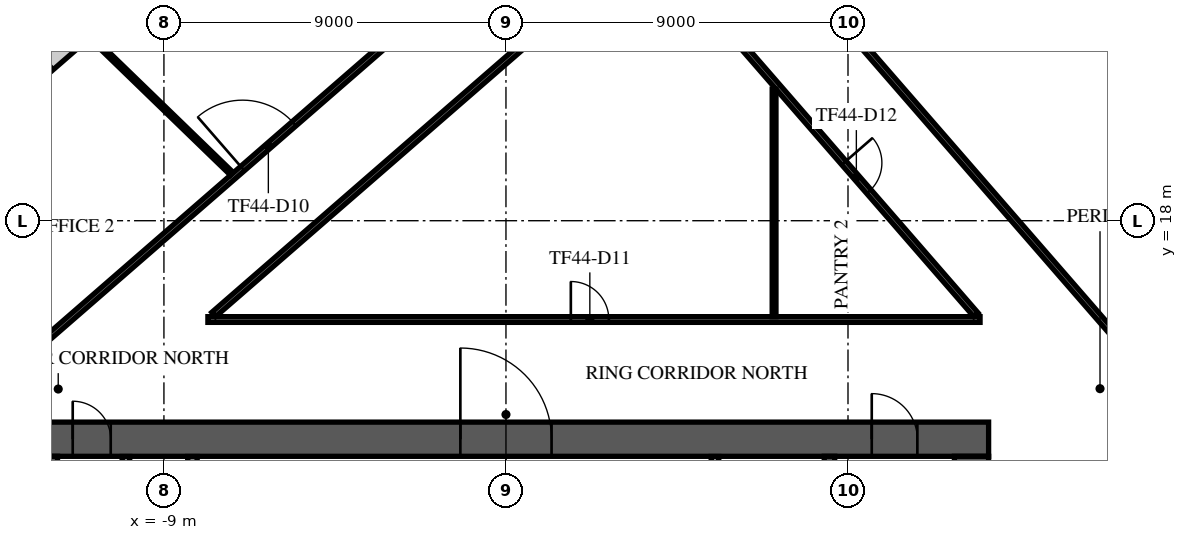
"""IFC4 building model, lengths in metres.
Left out: names, types, materials, properties, quantities, classifications, styles, units other than length and angle.
Written with IfcOpenShell. Run it as: python <this file> out.ifc"""

import sys

from ifc_helpers import new_model, si_unit, direction, frame, frame_2d, origin, place, context, subcontext, project, spatial, rectangle, extrude, element, fill, save


model = new_model("IFC4")
c1 = context("Model", 3, precision=1e-05, world=origin(), true_north=direction((0.0, 1.0)))
c2 = subcontext(c1, "Body", "Model", "MODEL_VIEW")
j1 = project(units=[si_unit("LENGTHUNIT", "METRE"), si_unit("PLANEANGLEUNIT", "RADIAN")], contexts=[c1])
p1 = place(None, origin())
s1 = spatial("IfcSite", under=j1, at=p1, CompositionType="ELEMENT")
p2 = place(p1, origin())
s2 = spatial("IfcBuilding", under=s1, at=p2, CompositionType="ELEMENT")
p3 = place(p2, frame((0.0, 0.0, 189.3)))
s3 = spatial("IfcBuildingStorey", under=s2, at=p3, CompositionType="ELEMENT", Elevation=189.3)
p4 = place(p3, frame((-12.7, 12.25, 0.0), z_axis=(0.0, 0.0, 1.0), x_axis=(1.0, 0.0, 0.0)))
e1 = element("IfcWall", 1, at=p4, inside=s3, PredefinedType="SHEAR", context=c2, shape_type="SweptSolid", body=[
    extrude(rectangle(XDim=25.4, YDim=0.9, at=frame_2d((12.7, 0.0))), origin(), (0.0, 0.0, 1.0), 3.62),
])
p5 = place(p4, frame((11.5, 0.0, 0.0)))
e2 = element("IfcOpeningElement", 2, at=p5, cuts=e1, PredefinedType="OPENING", context=c2, shape_type="SweptSolid", body=[
    extrude(rectangle(XDim=2.4, YDim=2.4, at=frame_2d((1.2, 1.2))), frame((0.0, 0.46, 0.0), z_axis=(0.0, -1.0, 0.0), x_axis=(1.0, 0.0, 0.0)), (0.0, 0.0, 1.0), 0.92),
])
p6 = place(p4, frame((22.325, 0.0, 0.0)))
e3 = element("IfcOpeningElement", 3, at=p6, cuts=e1, PredefinedType="OPENING", context=c2, shape_type="SweptSolid", body=[
    extrude(rectangle(XDim=1.2, YDim=2.1, at=frame_2d((0.6, 1.05))), frame((0.0, 0.46, 0.0), z_axis=(0.0, -1.0, 0.0), x_axis=(1.0, 0.0, 0.0)), (0.0, 0.0, 1.0), 0.92),
])
p7 = place(p4, frame((1.3, 0.0, 0.0)))
e4 = element("IfcOpeningElement", 4, at=p7, cuts=e1, PredefinedType="OPENING", context=c2, shape_type="SweptSolid", body=[
    extrude(rectangle(XDim=1.0, YDim=2.1, at=frame_2d((0.5, 1.05))), frame((0.0, 0.46, 0.0), z_axis=(0.0, -1.0, 0.0), x_axis=(1.0, 0.0, 0.0)), (0.0, 0.0, 1.0), 0.92),
])
p8 = place(p3, frame((12.25, -11.8, 0.0), z_axis=(0.0, 0.0, 1.0), x_axis=(0.0, 1.0, 0.0)))
e5 = element("IfcWall", 5, at=p8, inside=s3, PredefinedType="SHEAR", context=c2, shape_type="SweptSolid", body=[
    extrude(rectangle(XDim=23.6, YDim=0.9, at=frame_2d((11.8, 0.0))), origin(), (0.0, 0.0, 1.0), 3.62),
])
p9 = place(p8, frame((10.6, 0.0, 0.0)))
e6 = element("IfcOpeningElement", 6, at=p9, cuts=e5, PredefinedType="OPENING", context=c2, shape_type="SweptSolid", body=[
    extrude(rectangle(XDim=2.4, YDim=2.4, at=frame_2d((1.2, 1.2))), frame((0.0, 0.46, 0.0), z_axis=(0.0, -1.0, 0.0), x_axis=(1.0, 0.0, 0.0)), (0.0, 0.0, 1.0), 0.92),
])
p10 = place(p3, frame((-12.25, -11.8, 0.0), z_axis=(0.0, 0.0, 1.0), x_axis=(0.0, 1.0, 0.0)))
e7 = element("IfcWall", 7, at=p10, inside=s3, PredefinedType="SHEAR", context=c2, shape_type="SweptSolid", body=[
    extrude(rectangle(XDim=23.6, YDim=0.9, at=frame_2d((11.8, 0.0))), origin(), (0.0, 0.0, 1.0), 3.62),
])
p11 = place(p10, frame((10.6, 0.0, 0.0)))
e8 = element("IfcOpeningElement", 8, at=p11, cuts=e7, PredefinedType="OPENING", context=c2, shape_type="SweptSolid", body=[
    extrude(rectangle(XDim=2.4, YDim=2.4, at=frame_2d((1.2, 1.2))), frame((0.0, 0.46, 0.0), z_axis=(0.0, -1.0, 0.0), x_axis=(1.0, 0.0, 0.0)), (0.0, 0.0, 1.0), 0.92),
])
p12 = place(p3, frame((8.512, 4.55, 0.0), z_axis=(0.0, 0.0, 1.0), x_axis=(0.0, 1.0, 0.0)))
e9 = element("IfcWall", 9, at=p12, inside=s3, PredefinedType="SOLIDWALL", context=c2, shape_type="SweptSolid", body=[
    extrude(rectangle(XDim=7.25, YDim=0.275, at=frame_2d((3.625, 0.0))), origin(), (0.0, 0.0, 1.0), 3.62),
])
p13 = place(p12, frame((6.0, 0.0, 0.0)))
e10 = element("IfcOpeningElement", 10, at=p13, cuts=e9, PredefinedType="OPENING", context=c2, shape_type="SweptSolid", body=[
    extrude(rectangle(XDim=1.0, YDim=2.1, at=frame_2d((0.5, 1.05))), frame((0.0, 0.147, 0.0), z_axis=(0.0, -1.0, 0.0), x_axis=(1.0, 0.0, 0.0)), (0.0, 0.0, 1.0), 0.295),
])
p14 = place(p3, frame((-10.0, 4.78, 0.0), z_axis=(0.0, 0.0, 1.0), x_axis=(0.0, 1.0, 0.0)))
e11 = element("IfcWall", 11, at=p14, inside=s3, PredefinedType="PARTITIONING", context=c2, shape_type="SweptSolid", body=[
    extrude(rectangle(XDim=7.015, YDim=0.2, at=frame_2d((3.507, 0.0))), origin(), (0.0, 0.0, 1.0), 3.62),
])
p15 = place(p14, frame((2.92, 0.0, 0.0)))
e12 = element("IfcOpeningElement", 12, at=p15, cuts=e11, PredefinedType="OPENING", context=c2, shape_type="SweptSolid", body=[
    extrude(rectangle(XDim=1.0, YDim=2.1, at=frame_2d((0.5, 1.05))), frame((0.0, 0.11, 0.0), z_axis=(0.0, -1.0, 0.0), x_axis=(1.0, 0.0, 0.0)), (0.0, 0.0, 1.0), 0.22),
])
p16 = place(p3, frame((-8.25, 8.805, 0.0), z_axis=(0.0, 0.0, 1.0), x_axis=(0.0, 1.0, 0.0)))
e13 = element("IfcWall", 13, at=p16, inside=s3, PredefinedType="PARTITIONING", context=c2, shape_type="SweptSolid", body=[
    extrude(rectangle(XDim=2.99, YDim=0.25, at=frame_2d((1.495, 0.0))), origin(), (0.0, 0.0, 1.0), 3.62),
])
p17 = place(p16, frame((0.895, 0.0, 0.0)))
e14 = element("IfcOpeningElement", 14, at=p17, cuts=e13, PredefinedType="OPENING", context=c2, shape_type="SweptSolid", body=[
    extrude(rectangle(XDim=1.0, YDim=2.1, at=frame_2d((0.5, 1.05))), frame((0.0, 0.135, 0.0), z_axis=(0.0, -1.0, 0.0), x_axis=(1.0, 0.0, 0.0)), (0.0, 0.0, 1.0), 0.27),
])
p18 = place(p3, frame((5.5, 8.805, 0.0), z_axis=(0.0, 0.0, 1.0), x_axis=(0.0, 1.0, 0.0)))
e15 = element("IfcWall", 15, at=p18, inside=s3, PredefinedType="PARTITIONING", context=c2, shape_type="SweptSolid", body=[
    extrude(rectangle(XDim=2.99, YDim=0.2, at=frame_2d((1.495, 0.0))), origin(), (0.0, 0.0, 1.0), 3.62),
])
p19 = place(p18, frame((0.532, 0.0, 0.0)))
e16 = element("IfcOpeningElement", 16, at=p19, cuts=e15, PredefinedType="OPENING", context=c2, shape_type="SweptSolid", body=[
    extrude(rectangle(XDim=1.8, YDim=2.1, at=frame_2d((0.9, 1.05))), frame((0.0, 0.11, 0.0), z_axis=(0.0, -1.0, 0.0), x_axis=(1.0, 0.0, 0.0)), (0.0, 0.0, 1.0), 0.22),
])
p20 = place(p3, frame((2.286, 34.715, 0.0), z_axis=(0.0, 0.0, 1.0), x_axis=(-0.754708272811, -0.656060532993, 0.0)))
e17 = element("IfcWall", 17, at=p20, inside=s3, PredefinedType="STANDARD", context=c2, shape_type="SweptSolid", body=[
    extrude(rectangle(XDim=49.0, YDim=0.6, at=frame_2d((24.5, 0.0))), origin(), (0.0, 0.0, 1.0), 3.62),
])
p21 = place(p20, frame((1.227, 0.0, 0.9)))
e18 = element("IfcOpeningElement", 18, at=p21, cuts=e17, PredefinedType="OPENING", context=c2, shape_type="SweptSolid", body=[
    extrude(rectangle(XDim=2.0, YDim=2.1, at=frame_2d((1.0, 1.05))), frame((0.0, 0.31, 0.0), z_axis=(0.0, -1.0, 0.0), x_axis=(1.0, 0.0, 0.0)), (0.0, 0.0, 1.0), 0.62),
])
p22 = place(p20, frame((5.682, 0.0, 0.9)))
e19 = element("IfcOpeningElement", 19, at=p22, cuts=e17, PredefinedType="OPENING", context=c2, shape_type="SweptSolid", body=[
    extrude(rectangle(XDim=2.0, YDim=2.1, at=frame_2d((1.0, 1.05))), frame((0.0, 0.31, 0.0), z_axis=(0.0, -1.0, 0.0), x_axis=(1.0, 0.0, 0.0)), (0.0, 0.0, 1.0), 0.62),
])
p23 = place(p20, frame((10.136, 0.0, 0.9)))
e20 = element("IfcOpeningElement", 20, at=p23, cuts=e17, PredefinedType="OPENING", context=c2, shape_type="SweptSolid", body=[
    extrude(rectangle(XDim=2.0, YDim=2.1, at=frame_2d((1.0, 1.05))), frame((0.0, 0.31, 0.0), z_axis=(0.0, -1.0, 0.0), x_axis=(1.0, 0.0, 0.0)), (0.0, 0.0, 1.0), 0.62),
])
p24 = place(p20, frame((14.591, 0.0, 0.9)))
e21 = element("IfcOpeningElement", 21, at=p24, cuts=e17, PredefinedType="OPENING", context=c2, shape_type="SweptSolid", body=[
    extrude(rectangle(XDim=2.0, YDim=2.1, at=frame_2d((1.0, 1.05))), frame((0.0, 0.31, 0.0), z_axis=(0.0, -1.0, 0.0), x_axis=(1.0, 0.0, 0.0)), (0.0, 0.0, 1.0), 0.62),
])
p25 = place(p20, frame((19.045, 0.0, 0.9)))
e22 = element("IfcOpeningElement", 22, at=p25, cuts=e17, PredefinedType="OPENING", context=c2, shape_type="SweptSolid", body=[
    extrude(rectangle(XDim=2.0, YDim=2.1, at=frame_2d((1.0, 1.05))), frame((0.0, 0.31, 0.0), z_axis=(0.0, -1.0, 0.0), x_axis=(1.0, 0.0, 0.0)), (0.0, 0.0, 1.0), 0.62),
])
p26 = place(p20, frame((23.5, 0.0, 0.9)))
e23 = element("IfcOpeningElement", 23, at=p26, cuts=e17, PredefinedType="OPENING", context=c2, shape_type="SweptSolid", body=[
    extrude(rectangle(XDim=2.0, YDim=2.1, at=frame_2d((1.0, 1.05))), frame((0.0, 0.31, 0.0), z_axis=(0.0, -1.0, 0.0), x_axis=(1.0, 0.0, 0.0)), (0.0, 0.0, 1.0), 0.62),
])
p27 = place(p20, frame((27.955, 0.0, 0.9)))
e24 = element("IfcOpeningElement", 24, at=p27, cuts=e17, PredefinedType="OPENING", context=c2, shape_type="SweptSolid", body=[
    extrude(rectangle(XDim=2.0, YDim=2.1, at=frame_2d((1.0, 1.05))), frame((0.0, 0.31, 0.0), z_axis=(0.0, -1.0, 0.0), x_axis=(1.0, 0.0, 0.0)), (0.0, 0.0, 1.0), 0.62),
])
p28 = place(p20, frame((32.409, 0.0, 0.9)))
e25 = element("IfcOpeningElement", 25, at=p28, cuts=e17, PredefinedType="OPENING", context=c2, shape_type="SweptSolid", body=[
    extrude(rectangle(XDim=2.0, YDim=2.1, at=frame_2d((1.0, 1.05))), frame((0.0, 0.31, 0.0), z_axis=(0.0, -1.0, 0.0), x_axis=(1.0, 0.0, 0.0)), (0.0, 0.0, 1.0), 0.62),
])
p29 = place(p20, frame((36.864, 0.0, 0.9)))
e26 = element("IfcOpeningElement", 26, at=p29, cuts=e17, PredefinedType="OPENING", context=c2, shape_type="SweptSolid", body=[
    extrude(rectangle(XDim=2.0, YDim=2.1, at=frame_2d((1.0, 1.05))), frame((0.0, 0.31, 0.0), z_axis=(0.0, -1.0, 0.0), x_axis=(1.0, 0.0, 0.0)), (0.0, 0.0, 1.0), 0.62),
])
p30 = place(p20, frame((41.318, 0.0, 0.9)))
e27 = element("IfcOpeningElement", 27, at=p30, cuts=e17, PredefinedType="OPENING", context=c2, shape_type="SweptSolid", body=[
    extrude(rectangle(XDim=2.0, YDim=2.1, at=frame_2d((1.0, 1.05))), frame((0.0, 0.31, 0.0), z_axis=(0.0, -1.0, 0.0), x_axis=(1.0, 0.0, 0.0)), (0.0, 0.0, 1.0), 0.62),
])
p31 = place(p20, frame((45.773, 0.0, 0.9)))
e28 = element("IfcOpeningElement", 28, at=p31, cuts=e17, PredefinedType="OPENING", context=c2, shape_type="SweptSolid", body=[
    extrude(rectangle(XDim=2.0, YDim=2.1, at=frame_2d((1.0, 1.05))), frame((0.0, 0.31, 0.0), z_axis=(0.0, -1.0, 0.0), x_axis=(1.0, 0.0, 0.0)), (0.0, 0.0, 1.0), 0.62),
])
p32 = place(p3, frame((35.208, 4.768, 0.0), z_axis=(0.0, 0.0, 1.0), x_axis=(-0.656058749455, 0.754709823219, 0.0)))
e29 = element("IfcWall", 29, at=p32, inside=s3, PredefinedType="STANDARD", context=c2, shape_type="SweptSolid", body=[
    extrude(rectangle(XDim=39.0, YDim=0.6, at=frame_2d((19.5, 0.0))), origin(), (0.0, 0.0, 1.0), 3.62),
])
p33 = place(p32, frame((1.217, 0.0, 0.9)))
e30 = element("IfcOpeningElement", 30, at=p33, cuts=e29, PredefinedType="OPENING", context=c2, shape_type="SweptSolid", body=[
    extrude(rectangle(XDim=1.9, YDim=2.1, at=frame_2d((0.95, 1.05))), frame((0.0, 0.31, 0.0), z_axis=(0.0, -1.0, 0.0), x_axis=(1.0, 0.0, 0.0)), (0.0, 0.0, 1.0), 0.62),
])
p34 = place(p32, frame((5.55, 0.0, 0.9)))
e31 = element("IfcOpeningElement", 31, at=p34, cuts=e29, PredefinedType="OPENING", context=c2, shape_type="SweptSolid", body=[
    extrude(rectangle(XDim=1.9, YDim=2.1, at=frame_2d((0.95, 1.05))), frame((0.0, 0.31, 0.0), z_axis=(0.0, -1.0, 0.0), x_axis=(1.0, 0.0, 0.0)), (0.0, 0.0, 1.0), 0.62),
])
p35 = place(p32, frame((9.883, 0.0, 0.9)))
e32 = element("IfcOpeningElement", 32, at=p35, cuts=e29, PredefinedType="OPENING", context=c2, shape_type="SweptSolid", body=[
    extrude(rectangle(XDim=1.9, YDim=2.1, at=frame_2d((0.95, 1.05))), frame((0.0, 0.31, 0.0), z_axis=(0.0, -1.0, 0.0), x_axis=(1.0, 0.0, 0.0)), (0.0, 0.0, 1.0), 0.62),
])
p36 = place(p32, frame((14.217, 0.0, 0.9)))
e33 = element("IfcOpeningElement", 33, at=p36, cuts=e29, PredefinedType="OPENING", context=c2, shape_type="SweptSolid", body=[
    extrude(rectangle(XDim=1.9, YDim=2.1, at=frame_2d((0.95, 1.05))), frame((0.0, 0.31, 0.0), z_axis=(0.0, -1.0, 0.0), x_axis=(1.0, 0.0, 0.0)), (0.0, 0.0, 1.0), 0.62),
])
p37 = place(p32, frame((18.55, 0.0, 0.9)))
e34 = element("IfcOpeningElement", 34, at=p37, cuts=e29, PredefinedType="OPENING", context=c2, shape_type="SweptSolid", body=[
    extrude(rectangle(XDim=1.9, YDim=2.1, at=frame_2d((0.95, 1.05))), frame((0.0, 0.31, 0.0), z_axis=(0.0, -1.0, 0.0), x_axis=(1.0, 0.0, 0.0)), (0.0, 0.0, 1.0), 0.62),
])
p38 = place(p32, frame((22.883, 0.0, 0.9)))
e35 = element("IfcOpeningElement", 35, at=p38, cuts=e29, PredefinedType="OPENING", context=c2, shape_type="SweptSolid", body=[
    extrude(rectangle(XDim=1.9, YDim=2.1, at=frame_2d((0.95, 1.05))), frame((0.0, 0.31, 0.0), z_axis=(0.0, -1.0, 0.0), x_axis=(1.0, 0.0, 0.0)), (0.0, 0.0, 1.0), 0.62),
])
p39 = place(p32, frame((27.217, 0.0, 0.9)))
e36 = element("IfcOpeningElement", 36, at=p39, cuts=e29, PredefinedType="OPENING", context=c2, shape_type="SweptSolid", body=[
    extrude(rectangle(XDim=1.9, YDim=2.1, at=frame_2d((0.95, 1.05))), frame((0.0, 0.31, 0.0), z_axis=(0.0, -1.0, 0.0), x_axis=(1.0, 0.0, 0.0)), (0.0, 0.0, 1.0), 0.62),
])
p40 = place(p32, frame((31.55, 0.0, 0.9)))
e37 = element("IfcOpeningElement", 37, at=p40, cuts=e29, PredefinedType="OPENING", context=c2, shape_type="SweptSolid", body=[
    extrude(rectangle(XDim=1.9, YDim=2.1, at=frame_2d((0.95, 1.05))), frame((0.0, 0.31, 0.0), z_axis=(0.0, -1.0, 0.0), x_axis=(1.0, 0.0, 0.0)), (0.0, 0.0, 1.0), 0.62),
])
p41 = place(p32, frame((35.883, 0.0, 0.9)))
e38 = element("IfcOpeningElement", 38, at=p41, cuts=e29, PredefinedType="OPENING", context=c2, shape_type="SweptSolid", body=[
    extrude(rectangle(XDim=1.9, YDim=2.1, at=frame_2d((0.95, 1.05))), frame((0.0, 0.31, 0.0), z_axis=(0.0, -1.0, 0.0), x_axis=(1.0, 0.0, 0.0)), (0.0, 0.0, 1.0), 0.62),
])
p42 = place(p3, frame((-26.208, 2.616, 0.0), z_axis=(0.0, 0.0, 1.0), x_axis=(0.754710701231, 0.656057739416, 0.0)))
e39 = element("IfcWall", 39, at=p42, inside=s3, PredefinedType="PARTITIONING", context=c2, shape_type="SweptSolid", body=[
    extrude(rectangle(XDim=36.126, YDim=0.15, at=frame_2d((18.063, 0.0))), origin(), (0.0, 0.0, 1.0), 3.17),
])
p43 = place(p42, frame((2.551, 0.0, 0.0)))
e40 = element("IfcOpeningElement", 40, at=p43, cuts=e39, PredefinedType="OPENING", context=c2, shape_type="SweptSolid", body=[
    extrude(rectangle(XDim=1.0, YDim=2.1, at=frame_2d((0.5, 1.05))), frame((0.0, 0.085, 0.0), z_axis=(0.0, -1.0, 0.0), x_axis=(1.0, 0.0, 0.0)), (0.0, 0.0, 1.0), 0.17),
])
p44 = place(p42, frame((15.362, 0.0, 0.0)))
e41 = element("IfcOpeningElement", 41, at=p44, cuts=e39, PredefinedType="OPENING", context=c2, shape_type="SweptSolid", body=[
    extrude(rectangle(XDim=1.0, YDim=2.1, at=frame_2d((0.5, 1.05))), frame((0.0, 0.085, 0.0), z_axis=(0.0, -1.0, 0.0), x_axis=(1.0, 0.0, 0.0)), (0.0, 0.0, 1.0), 0.17),
])
p45 = place(p42, frame((25.542, 0.0, 0.0)))
e42 = element("IfcOpeningElement", 42, at=p45, cuts=e39, PredefinedType="OPENING", context=c2, shape_type="SweptSolid", body=[
    extrude(rectangle(XDim=1.8, YDim=2.1, at=frame_2d((0.9, 1.05))), frame((0.0, 0.085, 0.0), z_axis=(0.0, -1.0, 0.0), x_axis=(1.0, 0.0, 0.0)), (0.0, 0.0, 1.0), 0.17),
])
p46 = place(p3, frame((-7.843, 15.4, 0.0), z_axis=(0.0, 0.0, 1.0), x_axis=(1.0, 0.0, 0.0)))
e43 = element("IfcWall", 43, at=p46, inside=s3, PredefinedType="PARTITIONING", context=c2, shape_type="SweptSolid", body=[
    extrude(rectangle(XDim=20.318, YDim=0.15, at=frame_2d((10.159, 0.0))), origin(), (0.0, 0.0, 1.0), 3.17),
])
p47 = place(p46, frame((9.55, 0.0, 0.0)))
e44 = element("IfcOpeningElement", 44, at=p47, cuts=e43, PredefinedType="OPENING", context=c2, shape_type="SweptSolid", body=[
    extrude(rectangle(XDim=1.0, YDim=2.1, at=frame_2d((0.5, 1.05))), frame((0.0, 0.085, 0.0), z_axis=(0.0, -1.0, 0.0), x_axis=(1.0, 0.0, 0.0)), (0.0, 0.0, 1.0), 0.17),
])
p48 = place(p3, frame((-7.692, 15.531, 0.0), z_axis=(0.0, 0.0, 1.0), x_axis=(0.754705202017, 0.656064065506, 0.0)))
e45 = element("IfcWall", 45, at=p48, inside=s3, PredefinedType="PARTITIONING", context=c2, shape_type="SweptSolid", body=[
    extrude(rectangle(XDim=13.603, YDim=0.15, at=frame_2d((6.801, 0.0))), origin(), (0.0, 0.0, 1.0), 3.17),
])
p49 = place(p3, frame((6.292, 22.512, 0.0), z_axis=(0.0, 0.0, 1.0), x_axis=(0.656052066859, -0.754715632255, 0.0)))
e46 = element("IfcWall", 46, at=p49, inside=s3, PredefinedType="PARTITIONING", context=c2, shape_type="SweptSolid", body=[
    extrude(rectangle(XDim=9.26, YDim=0.15, at=frame_2d((4.63, 0.0))), origin(), (0.0, 0.0, 1.0), 3.17),
])
p50 = place(p49, frame((3.963, 0.0, 0.0)))
e47 = element("IfcOpeningElement", 47, at=p50, cuts=e46, PredefinedType="OPENING", context=c2, shape_type="SweptSolid", body=[
    extrude(rectangle(XDim=1.0, YDim=2.1, at=frame_2d((0.5, 1.05))), frame((0.0, 0.085, 0.0), z_axis=(0.0, -1.0, 0.0), x_axis=(1.0, 0.0, 0.0)), (0.0, 0.0, 1.0), 0.17),
])
p51 = place(p3, frame((8.103, 24.087, 0.0), z_axis=(0.0, 0.0, 1.0), x_axis=(0.656048444225, -0.754718781289, 0.0)))
e48 = element("IfcWall", 48, at=p51, inside=s3, PredefinedType="PARTITIONING", context=c2, shape_type="SweptSolid", body=[
    extrude(rectangle(XDim=25.8, YDim=0.15, at=frame_2d((12.9, 0.0))), origin(), (0.0, 0.0, 1.0), 3.17),
])
p52 = place(p3, frame((-10.926, 22.83, 0.0), z_axis=(0.0, 0.0, 1.0), x_axis=(0.718303647436, -0.695729739252, 0.0)))
e49 = element("IfcWall", 49, at=p52, inside=s3, PredefinedType="PARTITIONING", context=c2, shape_type="SweptSolid", body=[
    extrude(rectangle(XDim=5.17, YDim=0.1, at=frame_2d((2.585, 0.0))), origin(), (0.0, 0.0, 1.0), 3.17),
])
p53 = place(p3, frame((7.055, 15.475, 0.0), z_axis=(0.0, 0.0, 1.0), x_axis=(0.0, 1.0, 0.0)))
e50 = element("IfcWall", 50, at=p53, inside=s3, PredefinedType="PARTITIONING", context=c2, shape_type="SweptSolid", body=[
    extrude(rectangle(XDim=5.988, YDim=0.1, at=frame_2d((2.994, 0.0))), origin(), (0.0, 0.0, 1.0), 3.62),
])
p54 = place(p5, origin())
e51 = element("IfcDoor", 51, at=p54, inside=s3, OperationType="SINGLE_SWING_LEFT", PredefinedType="DOOR", context=c2, shape_type="SweptSolid", body=[
    extrude(rectangle(XDim=2.4, YDim=2.4, at=frame_2d((1.2, 1.2))), frame((0.0, 0.025, 0.0), z_axis=(0.0, -1.0, 0.0), x_axis=(1.0, 0.0, 0.0)), (0.0, 0.0, 1.0), 0.05),
])
fill(e2, e51)
p55 = place(p6, origin())
e52 = element("IfcDoor", 52, at=p55, inside=s3, OperationType="SINGLE_SWING_LEFT", PredefinedType="DOOR", context=c2, shape_type="SweptSolid", body=[
    extrude(rectangle(XDim=1.2, YDim=2.1, at=frame_2d((0.6, 1.05))), frame((0.0, 0.025, 0.0), z_axis=(0.0, -1.0, 0.0), x_axis=(1.0, 0.0, 0.0)), (0.0, 0.0, 1.0), 0.05),
])
fill(e3, e52)
p56 = place(p7, origin())
e53 = element("IfcDoor", 53, at=p56, inside=s3, OperationType="SINGLE_SWING_LEFT", PredefinedType="DOOR", context=c2, shape_type="SweptSolid", body=[
    extrude(rectangle(XDim=1.0, YDim=2.1, at=frame_2d((0.5, 1.05))), frame((0.0, 0.025, 0.0), z_axis=(0.0, -1.0, 0.0), x_axis=(1.0, 0.0, 0.0)), (0.0, 0.0, 1.0), 0.05),
])
fill(e4, e53)
p57 = place(p45, origin())
e54 = element("IfcDoor", 54, at=p57, inside=s3, OperationType="DOUBLE_DOOR_SINGLE_SWING", PredefinedType="DOOR", context=c2, shape_type="SweptSolid", body=[
    extrude(rectangle(XDim=1.8, YDim=2.1, at=frame_2d((0.9, 1.05))), frame((0.0, 0.025, 0.0), z_axis=(0.0, -1.0, 0.0), x_axis=(1.0, 0.0, 0.0)), (0.0, 0.0, 1.0), 0.05),
])
fill(e42, e54)
p58 = place(p47, origin())
e55 = element("IfcDoor", 55, at=p58, inside=s3, OperationType="SINGLE_SWING_LEFT", PredefinedType="DOOR", context=c2, shape_type="SweptSolid", body=[
    extrude(rectangle(XDim=1.0, YDim=2.1, at=frame_2d((0.5, 1.05))), frame((0.0, 0.025, 0.0), z_axis=(0.0, -1.0, 0.0), x_axis=(1.0, 0.0, 0.0)), (0.0, 0.0, 1.0), 0.05),
])
fill(e44, e55)
p59 = place(p50, frame((1.0, 0.0, 0.0), z_axis=(0.0, 0.0, 1.0), x_axis=(-1.0, 0.0, 0.0)))
e56 = element("IfcDoor", 56, at=p59, inside=s3, OperationType="SINGLE_SWING_RIGHT", PredefinedType="DOOR", context=c2, shape_type="SweptSolid", body=[
    extrude(rectangle(XDim=1.0, YDim=2.1, at=frame_2d((0.5, 1.05))), frame((0.0, 0.025, 0.0), z_axis=(0.0, -1.0, 0.0), x_axis=(1.0, 0.0, 0.0)), (0.0, 0.0, 1.0), 0.05),
])
fill(e47, e56)
save(model, sys.argv[1])
